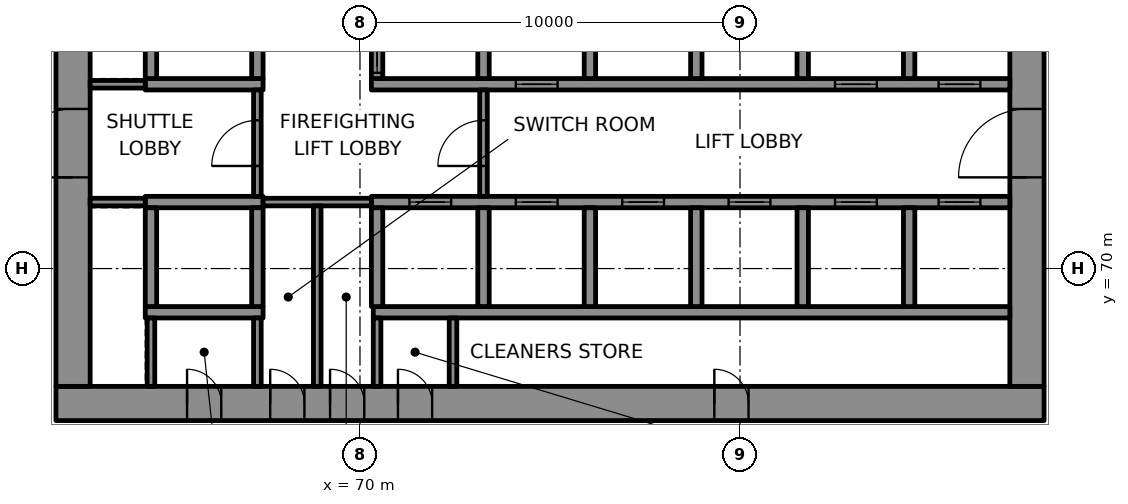
"""IFC4 building model, lengths in metres.
Left out: names, types, materials, properties, quantities, classifications, styles, units other than length and angle.
Written with IfcOpenShell. Run it as: python <this file> out.ifc"""

import sys

from ifc_helpers import new_model, si_unit, direction, frame, frame_2d, origin, place, context, subcontext, project, spatial, rectangle, extrude, element, fill, save


model = new_model("IFC4")
c1 = context("Model", 3, precision=1e-05, world=origin(), true_north=direction((0.0, 1.0)))
c2 = subcontext(c1, "Body", "Model", "MODEL_VIEW")
j1 = project(units=[si_unit("LENGTHUNIT", "METRE"), si_unit("PLANEANGLEUNIT", "RADIAN")], contexts=[c1])
p1 = place(None, origin())
s1 = spatial("IfcSite", under=j1, at=p1, CompositionType="ELEMENT")
p2 = place(p1, origin())
s2 = spatial("IfcBuilding", under=s1, at=p2, CompositionType="ELEMENT")
p3 = place(p2, frame((0.0, 0.0, 69.4)))
s3 = spatial("IfcBuildingStorey", under=s2, at=p3, CompositionType="ELEMENT", Elevation=69.4)
p4 = place(p3, frame((62.0, 66.45, 0.0), z_axis=(0.0, 0.0, 1.0), x_axis=(1.0, 0.0, 0.0)))
e1 = element("IfcWall", 1, at=p4, inside=s3, PredefinedType="SHEAR", context=c2, shape_type="SweptSolid", body=[
    extrude(rectangle(XDim=26.0, YDim=0.9, at=frame_2d((13.0, 0.0))), origin(), (0.0, 0.0, 1.0), 4.0),
])
p5 = place(p4, frame((3.45, 0.0, 0.0)))
e2 = element("IfcOpeningElement", 2, at=p5, cuts=e1, PredefinedType="OPENING", context=c2, shape_type="SweptSolid", body=[
    extrude(rectangle(XDim=0.9, YDim=2.1, at=frame_2d((0.45, 1.05))), frame((0.0, 0.46, 0.0), z_axis=(0.0, -1.0, 0.0), x_axis=(1.0, 0.0, 0.0)), (0.0, 0.0, 1.0), 0.92),
])
p6 = place(p4, frame((5.637, 0.0, 0.0)))
e3 = element("IfcOpeningElement", 3, at=p6, cuts=e1, PredefinedType="OPENING", context=c2, shape_type="SweptSolid", body=[
    extrude(rectangle(XDim=0.9, YDim=2.1, at=frame_2d((0.45, 1.05))), frame((0.0, 0.46, 0.0), z_axis=(0.0, -1.0, 0.0), x_axis=(1.0, 0.0, 0.0)), (0.0, 0.0, 1.0), 0.92),
])
p7 = place(p4, frame((7.212, 0.0, 0.0)))
e4 = element("IfcOpeningElement", 4, at=p7, cuts=e1, PredefinedType="OPENING", context=c2, shape_type="SweptSolid", body=[
    extrude(rectangle(XDim=0.9, YDim=2.1, at=frame_2d((0.45, 1.05))), frame((0.0, 0.46, 0.0), z_axis=(0.0, -1.0, 0.0), x_axis=(1.0, 0.0, 0.0)), (0.0, 0.0, 1.0), 0.92),
])
p8 = place(p4, frame((8.999, 0.0, 0.0)))
e5 = element("IfcOpeningElement", 5, at=p8, cuts=e1, PredefinedType="OPENING", context=c2, shape_type="SweptSolid", body=[
    extrude(rectangle(XDim=0.9, YDim=2.1, at=frame_2d((0.45, 1.05))), frame((0.0, 0.46, 0.0), z_axis=(0.0, -1.0, 0.0), x_axis=(1.0, 0.0, 0.0)), (0.0, 0.0, 1.0), 0.92),
])
p9 = place(p4, frame((17.324, 0.0, 0.0)))
e6 = element("IfcOpeningElement", 6, at=p9, cuts=e1, PredefinedType="OPENING", context=c2, shape_type="SweptSolid", body=[
    extrude(rectangle(XDim=0.9, YDim=2.1, at=frame_2d((0.45, 1.05))), frame((0.0, 0.46, 0.0), z_axis=(0.0, -1.0, 0.0), x_axis=(1.0, 0.0, 0.0)), (0.0, 0.0, 1.0), 0.92),
])
p10 = place(p3, frame((62.45, 66.9, 0.0), z_axis=(0.0, 0.0, 1.0), x_axis=(0.0, 1.0, 0.0)))
e7 = element("IfcWall", 7, at=p10, inside=s3, PredefinedType="SHEAR", context=c2, shape_type="SweptSolid", body=[
    extrude(rectangle(XDim=16.2, YDim=0.9, at=frame_2d((8.1, 0.0))), origin(), (0.0, 0.0, 1.0), 4.0),
])
p11 = place(p10, frame((5.5, 0.0, 0.0)))
e8 = element("IfcOpeningElement", 8, at=p11, cuts=e7, PredefinedType="OPENING", context=c2, shape_type="SweptSolid", body=[
    extrude(rectangle(XDim=1.8, YDim=2.1, at=frame_2d((0.9, 1.05))), frame((0.0, 0.46, 0.0), z_axis=(0.0, -1.0, 0.0), x_axis=(1.0, 0.0, 0.0)), (0.0, 0.0, 1.0), 0.92),
])
p12 = place(p3, frame((87.55, 66.9, 0.0), z_axis=(0.0, 0.0, 1.0), x_axis=(0.0, 1.0, 0.0)))
e9 = element("IfcWall", 9, at=p12, inside=s3, PredefinedType="SHEAR", context=c2, shape_type="SweptSolid", body=[
    extrude(rectangle(XDim=16.2, YDim=0.9, at=frame_2d((8.1, 0.0))), origin(), (0.0, 0.0, 1.0), 4.0),
])
p13 = place(p12, frame((5.5, 0.0, 0.0)))
e10 = element("IfcOpeningElement", 10, at=p13, cuts=e9, PredefinedType="OPENING", context=c2, shape_type="SweptSolid", body=[
    extrude(rectangle(XDim=1.8, YDim=2.1, at=frame_2d((0.9, 1.05))), frame((0.0, 0.46, 0.0), z_axis=(0.0, -1.0, 0.0), x_axis=(1.0, 0.0, 0.0)), (0.0, 0.0, 1.0), 0.92),
])
p14 = place(p12, frame((11.202, 0.0, 0.0)))
e11 = element("IfcOpeningElement", 11, at=p14, cuts=e9, PredefinedType="OPENING", context=c2, shape_type="SweptSolid", body=[
    extrude(rectangle(XDim=0.9, YDim=2.1, at=frame_2d((0.45, 1.05))), frame((0.0, 0.46, 0.0), z_axis=(0.0, -1.0, 0.0), x_axis=(1.0, 0.0, 0.0)), (0.0, 0.0, 1.0), 0.92),
])
p15 = place(p3, frame((64.35, 68.85, 0.0), z_axis=(0.0, 0.0, 1.0), x_axis=(1.0, 0.0, 0.0)))
e12 = element("IfcWall", 12, at=p15, inside=s3, PredefinedType="SHEAR", context=c2, shape_type="SweptSolid", body=[
    extrude(rectangle(XDim=3.1, YDim=0.3, at=frame_2d((1.55, 0.0))), origin(), (0.0, 0.0, 1.0), 4.0),
])
p16 = place(p3, frame((70.35, 68.85, 0.0), z_axis=(0.0, 0.0, 1.0), x_axis=(1.0, 0.0, 0.0)))
e13 = element("IfcWall", 13, at=p16, inside=s3, PredefinedType="SHEAR", context=c2, shape_type="SweptSolid", body=[
    extrude(rectangle(XDim=16.75, YDim=0.3, at=frame_2d((8.375, 0.0))), origin(), (0.0, 0.0, 1.0), 4.0),
])
p17 = place(p3, frame((64.35, 71.75, 0.0), z_axis=(0.0, 0.0, 1.0), x_axis=(1.0, 0.0, 0.0)))
e14 = element("IfcWall", 14, at=p17, inside=s3, PredefinedType="SHEAR", context=c2, shape_type="SweptSolid", body=[
    extrude(rectangle(XDim=3.1, YDim=0.3, at=frame_2d((1.55, 0.0))), origin(), (0.0, 0.0, 1.0), 4.0),
])
p18 = place(p3, frame((70.3, 71.75, 0.0), z_axis=(0.0, 0.0, 1.0), x_axis=(1.0, 0.0, 0.0)))
e15 = element("IfcWall", 15, at=p18, inside=s3, PredefinedType="SHEAR", context=c2, shape_type="SweptSolid", body=[
    extrude(rectangle(XDim=16.8, YDim=0.3, at=frame_2d((8.4, 0.0))), origin(), (0.0, 0.0, 1.0), 4.0),
])
p19 = place(p18, frame((1.0, 0.0, 0.0)))
e16 = element("IfcOpeningElement", 16, at=p19, cuts=e15, PredefinedType="OPENING", context=c2, shape_type="SweptSolid", body=[
    extrude(rectangle(XDim=1.1, YDim=2.1, at=frame_2d((0.55, 1.05))), frame((0.0, 0.16, 0.0), z_axis=(0.0, -1.0, 0.0), x_axis=(1.0, 0.0, 0.0)), (0.0, 0.0, 1.0), 0.32),
])
p20 = place(p18, frame((3.8, 0.0, 0.0)))
e17 = element("IfcOpeningElement", 17, at=p20, cuts=e15, PredefinedType="OPENING", context=c2, shape_type="SweptSolid", body=[
    extrude(rectangle(XDim=1.1, YDim=2.1, at=frame_2d((0.55, 1.05))), frame((0.0, 0.16, 0.0), z_axis=(0.0, -1.0, 0.0), x_axis=(1.0, 0.0, 0.0)), (0.0, 0.0, 1.0), 0.32),
])
p21 = place(p18, frame((6.6, 0.0, 0.0)))
e18 = element("IfcOpeningElement", 18, at=p21, cuts=e15, PredefinedType="OPENING", context=c2, shape_type="SweptSolid", body=[
    extrude(rectangle(XDim=1.1, YDim=2.1, at=frame_2d((0.55, 1.05))), frame((0.0, 0.16, 0.0), z_axis=(0.0, -1.0, 0.0), x_axis=(1.0, 0.0, 0.0)), (0.0, 0.0, 1.0), 0.32),
])
p22 = place(p18, frame((9.4, 0.0, 0.0)))
e19 = element("IfcOpeningElement", 19, at=p22, cuts=e15, PredefinedType="OPENING", context=c2, shape_type="SweptSolid", body=[
    extrude(rectangle(XDim=1.1, YDim=2.1, at=frame_2d((0.55, 1.05))), frame((0.0, 0.16, 0.0), z_axis=(0.0, -1.0, 0.0), x_axis=(1.0, 0.0, 0.0)), (0.0, 0.0, 1.0), 0.32),
])
p23 = place(p18, frame((12.2, 0.0, 0.0)))
e20 = element("IfcOpeningElement", 20, at=p23, cuts=e15, PredefinedType="OPENING", context=c2, shape_type="SweptSolid", body=[
    extrude(rectangle(XDim=1.1, YDim=2.1, at=frame_2d((0.55, 1.05))), frame((0.0, 0.16, 0.0), z_axis=(0.0, -1.0, 0.0), x_axis=(1.0, 0.0, 0.0)), (0.0, 0.0, 1.0), 0.32),
])
p24 = place(p18, frame((14.925, 0.0, 0.0)))
e21 = element("IfcOpeningElement", 21, at=p24, cuts=e15, PredefinedType="OPENING", context=c2, shape_type="SweptSolid", body=[
    extrude(rectangle(XDim=1.1, YDim=2.1, at=frame_2d((0.55, 1.05))), frame((0.0, 0.16, 0.0), z_axis=(0.0, -1.0, 0.0), x_axis=(1.0, 0.0, 0.0)), (0.0, 0.0, 1.0), 0.32),
])
p25 = place(p3, frame((64.35, 74.85, 0.0), z_axis=(0.0, 0.0, 1.0), x_axis=(1.0, 0.0, 0.0)))
e22 = element("IfcWall", 22, at=p25, inside=s3, PredefinedType="SHEAR", context=c2, shape_type="SweptSolid", body=[
    extrude(rectangle(XDim=3.1, YDim=0.3, at=frame_2d((1.55, 0.0))), origin(), (0.0, 0.0, 1.0), 4.0),
])
p26 = place(p3, frame((70.3, 74.85, 0.0), z_axis=(0.0, 0.0, 1.0), x_axis=(1.0, 0.0, 0.0)))
e23 = element("IfcWall", 23, at=p26, inside=s3, PredefinedType="SHEAR", context=c2, shape_type="SweptSolid", body=[
    extrude(rectangle(XDim=16.8, YDim=0.3, at=frame_2d((8.4, 0.0))), origin(), (0.0, 0.0, 1.0), 4.0),
])
p27 = place(p26, frame((3.8, 0.0, 0.0)))
e24 = element("IfcOpeningElement", 24, at=p27, cuts=e23, PredefinedType="OPENING", context=c2, shape_type="SweptSolid", body=[
    extrude(rectangle(XDim=1.1, YDim=2.1, at=frame_2d((0.55, 1.05))), frame((0.0, 0.16, 0.0), z_axis=(0.0, -1.0, 0.0), x_axis=(1.0, 0.0, 0.0)), (0.0, 0.0, 1.0), 0.32),
])
p28 = place(p26, frame((12.2, 0.0, 0.0)))
e25 = element("IfcOpeningElement", 25, at=p28, cuts=e23, PredefinedType="OPENING", context=c2, shape_type="SweptSolid", body=[
    extrude(rectangle(XDim=1.1, YDim=2.1, at=frame_2d((0.55, 1.05))), frame((0.0, 0.16, 0.0), z_axis=(0.0, -1.0, 0.0), x_axis=(1.0, 0.0, 0.0)), (0.0, 0.0, 1.0), 0.32),
])
p29 = place(p26, frame((14.925, 0.0, 0.0)))
e26 = element("IfcOpeningElement", 26, at=p29, cuts=e23, PredefinedType="OPENING", context=c2, shape_type="SweptSolid", body=[
    extrude(rectangle(XDim=1.1, YDim=2.1, at=frame_2d((0.55, 1.05))), frame((0.0, 0.16, 0.0), z_axis=(0.0, -1.0, 0.0), x_axis=(1.0, 0.0, 0.0)), (0.0, 0.0, 1.0), 0.32),
])
for number, where, z_axis, x_axis in (
    (27, (64.5, 69.0, 0.0), (0.0, 0.0, 1.0), (0.0, 1.0, 0.0)),
    (28, (64.5, 75.0, 0.0), (0.0, 0.0, 1.0), (0.0, 1.0, 0.0)),
    (29, (67.3, 69.0, 0.0), (0.0, 0.0, 1.0), (0.0, 1.0, 0.0)),
    (30, (67.3, 75.0, 0.0), (0.0, 0.0, 1.0), (0.0, 1.0, 0.0)),
    (31, (70.45, 69.0, 0.0), (0.0, 0.0, 1.0), (0.0, 1.0, 0.0)),
):
    element("IfcWall", number, at=place(p3, frame(where, z_axis=z_axis, x_axis=x_axis)), inside=s3, PredefinedType="SHEAR", context=c2, shape_type="SweptSolid", body=[
        extrude(rectangle(XDim=2.6, YDim=0.3, at=frame_2d((1.3, 0.0))), origin(), (0.0, 0.0, 1.0), 4.0),
    ])
p30 = place(p3, frame((70.45, 75.0, 0.0), z_axis=(0.0, 0.0, 1.0), x_axis=(0.0, 1.0, 0.0)))
e32 = element("IfcWall", 32, at=p30, inside=s3, PredefinedType="SHEAR", context=c2, shape_type="SweptSolid", body=[
    extrude(rectangle(XDim=2.6, YDim=0.3, at=frame_2d((1.3, 0.0))), origin(), (0.0, 0.0, 1.0), 4.0),
])
p31 = place(p30, frame((0.15, 0.0, 0.0)))
e33 = element("IfcOpeningElement", 33, at=p31, cuts=e32, PredefinedType="OPENING", context=c2, shape_type="SweptSolid", body=[
    extrude(rectangle(XDim=1.1, YDim=2.1, at=frame_2d((0.55, 1.05))), frame((0.0, 0.16, 0.0), z_axis=(0.0, -1.0, 0.0), x_axis=(1.0, 0.0, 0.0)), (0.0, 0.0, 1.0), 0.32),
])
for number, where, z_axis, x_axis in (
    (34, (73.25, 69.0, 0.0), (0.0, 0.0, 1.0), (0.0, 1.0, 0.0)),
    (35, (73.25, 75.0, 0.0), (0.0, 0.0, 1.0), (0.0, 1.0, 0.0)),
    (36, (76.05, 69.0, 0.0), (0.0, 0.0, 1.0), (0.0, 1.0, 0.0)),
    (37, (76.05, 75.0, 0.0), (0.0, 0.0, 1.0), (0.0, 1.0, 0.0)),
    (38, (78.85, 69.0, 0.0), (0.0, 0.0, 1.0), (0.0, 1.0, 0.0)),
    (39, (78.85, 75.0, 0.0), (0.0, 0.0, 1.0), (0.0, 1.0, 0.0)),
    (40, (81.65, 69.0, 0.0), (0.0, 0.0, 1.0), (0.0, 1.0, 0.0)),
    (41, (81.65, 75.0, 0.0), (0.0, 0.0, 1.0), (0.0, 1.0, 0.0)),
    (42, (84.45, 69.0, 0.0), (0.0, 0.0, 1.0), (0.0, 1.0, 0.0)),
    (43, (84.45, 75.0, 0.0), (0.0, 0.0, 1.0), (0.0, 1.0, 0.0)),
):
    element("IfcWall", number, at=place(p3, frame(where, z_axis=z_axis, x_axis=x_axis)), inside=s3, PredefinedType="SHEAR", context=c2, shape_type="SweptSolid", body=[
        extrude(rectangle(XDim=2.6, YDim=0.3, at=frame_2d((1.3, 0.0))), origin(), (0.0, 0.0, 1.0), 4.0),
    ])
p32 = place(p3, frame((62.9, 71.75, 0.0), z_axis=(0.0, 0.0, 1.0), x_axis=(1.0, 0.0, 0.0)))
e44 = element("IfcWall", 44, at=p32, inside=s3, PredefinedType="PARTITIONING", context=c2, shape_type="SweptSolid", body=[
    extrude(rectangle(XDim=1.45, YDim=0.2, at=frame_2d((0.725, 0.0))), origin(), (0.0, 0.0, 1.0), 4.0),
])
p33 = place(p3, frame((67.45, 71.75, 0.0), z_axis=(0.0, 0.0, 1.0), x_axis=(1.0, 0.0, 0.0)))
e45 = element("IfcWall", 45, at=p33, inside=s3, PredefinedType="PARTITIONING", context=c2, shape_type="SweptSolid", body=[
    extrude(rectangle(XDim=2.85, YDim=0.2, at=frame_2d((1.425, 0.0))), origin(), (0.0, 0.0, 1.0), 4.0),
])
p34 = place(p3, frame((62.9, 74.85, 0.0), z_axis=(0.0, 0.0, 1.0), x_axis=(1.0, 0.0, 0.0)))
e46 = element("IfcWall", 46, at=p34, inside=s3, PredefinedType="PARTITIONING", context=c2, shape_type="SweptSolid", body=[
    extrude(rectangle(XDim=1.45, YDim=0.2, at=frame_2d((0.725, 0.0))), origin(), (0.0, 0.0, 1.0), 4.0),
])
for number, where, z_axis, x_axis in (
    (47, (64.5, 66.9, 0.0), (0.0, 0.0, 1.0), (0.0, 1.0, 0.0)),
    (48, (67.3, 66.9, 0.0), (0.0, 0.0, 1.0), (0.0, 1.0, 0.0)),
):
    element("IfcWall", number, at=place(p3, frame(where, z_axis=z_axis, x_axis=x_axis)), inside=s3, PredefinedType="PARTITIONING", context=c2, shape_type="SweptSolid", body=[
        extrude(rectangle(XDim=1.8, YDim=0.2, at=frame_2d((0.9, 0.0))), origin(), (0.0, 0.0, 1.0), 4.0),
    ])
p35 = place(p3, frame((67.3, 71.9, 0.0), z_axis=(0.0, 0.0, 1.0), x_axis=(0.0, 1.0, 0.0)))
e49 = element("IfcWall", 49, at=p35, inside=s3, PredefinedType="PARTITIONING", context=c2, shape_type="SweptSolid", body=[
    extrude(rectangle(XDim=2.8, YDim=0.2, at=frame_2d((1.4, 0.0))), origin(), (0.0, 0.0, 1.0), 4.0),
])
p36 = place(p35, frame((0.8, 0.0, 0.0)))
e50 = element("IfcOpeningElement", 50, at=p36, cuts=e49, PredefinedType="OPENING", context=c2, shape_type="SweptSolid", body=[
    extrude(rectangle(XDim=1.2, YDim=2.1, at=frame_2d((0.6, 1.05))), frame((0.0, 0.11, 0.0), z_axis=(0.0, -1.0, 0.0), x_axis=(1.0, 0.0, 0.0)), (0.0, 0.0, 1.0), 0.22),
])
p37 = place(p3, frame((68.875, 66.9, 0.0), z_axis=(0.0, 0.0, 1.0), x_axis=(0.0, 1.0, 0.0)))
e51 = element("IfcWall", 51, at=p37, inside=s3, PredefinedType="PARTITIONING", context=c2, shape_type="SweptSolid", body=[
    extrude(rectangle(XDim=4.75, YDim=0.2, at=frame_2d((2.375, 0.0))), origin(), (0.0, 0.0, 1.0), 4.0),
])
for number, where, z_axis, x_axis in (
    (52, (70.45, 66.9, 0.0), (0.0, 0.0, 1.0), (0.0, 1.0, 0.0)),
    (53, (72.448, 66.9, 0.0), (0.0, 0.0, 1.0), (0.0, 1.0, 0.0)),
):
    element("IfcWall", number, at=place(p3, frame(where, z_axis=z_axis, x_axis=x_axis)), inside=s3, PredefinedType="PARTITIONING", context=c2, shape_type="SweptSolid", body=[
        extrude(rectangle(XDim=1.8, YDim=0.2, at=frame_2d((0.9, 0.0))), origin(), (0.0, 0.0, 1.0), 4.0),
    ])
p38 = place(p3, frame((73.25, 71.9, 0.0), z_axis=(0.0, 0.0, 1.0), x_axis=(0.0, 1.0, 0.0)))
e54 = element("IfcWall", 54, at=p38, inside=s3, PredefinedType="PARTITIONING", context=c2, shape_type="SweptSolid", body=[
    extrude(rectangle(XDim=2.8, YDim=0.2, at=frame_2d((1.4, 0.0))), origin(), (0.0, 0.0, 1.0), 4.0),
])
p39 = place(p38, frame((0.8, 0.0, 0.0)))
e55 = element("IfcOpeningElement", 55, at=p39, cuts=e54, PredefinedType="OPENING", context=c2, shape_type="SweptSolid", body=[
    extrude(rectangle(XDim=1.2, YDim=2.1, at=frame_2d((0.6, 1.05))), frame((0.0, 0.11, 0.0), z_axis=(0.0, -1.0, 0.0), x_axis=(1.0, 0.0, 0.0)), (0.0, 0.0, 1.0), 0.22),
])
p40 = place(p19, origin())
e56 = element("IfcDoor", 56, at=p40, inside=s3, OperationType="DOUBLE_DOOR_SLIDING", PredefinedType="DOOR", context=c2, shape_type="SweptSolid", body=[
    extrude(rectangle(XDim=1.1, YDim=2.1, at=frame_2d((0.55, 1.05))), frame((0.0, 0.025, 0.0), z_axis=(0.0, -1.0, 0.0), x_axis=(1.0, 0.0, 0.0)), (0.0, 0.0, 1.0), 0.05),
])
fill(e16, e56)
p41 = place(p20, origin())
e57 = element("IfcDoor", 57, at=p41, inside=s3, OperationType="DOUBLE_DOOR_SLIDING", PredefinedType="DOOR", context=c2, shape_type="SweptSolid", body=[
    extrude(rectangle(XDim=1.1, YDim=2.1, at=frame_2d((0.55, 1.05))), frame((0.0, 0.025, 0.0), z_axis=(0.0, -1.0, 0.0), x_axis=(1.0, 0.0, 0.0)), (0.0, 0.0, 1.0), 0.05),
])
fill(e17, e57)
p42 = place(p21, origin())
e58 = element("IfcDoor", 58, at=p42, inside=s3, OperationType="DOUBLE_DOOR_SLIDING", PredefinedType="DOOR", context=c2, shape_type="SweptSolid", body=[
    extrude(rectangle(XDim=1.1, YDim=2.1, at=frame_2d((0.55, 1.05))), frame((0.0, 0.025, 0.0), z_axis=(0.0, -1.0, 0.0), x_axis=(1.0, 0.0, 0.0)), (0.0, 0.0, 1.0), 0.05),
])
fill(e18, e58)
p43 = place(p22, origin())
e59 = element("IfcDoor", 59, at=p43, inside=s3, OperationType="DOUBLE_DOOR_SLIDING", PredefinedType="DOOR", context=c2, shape_type="SweptSolid", body=[
    extrude(rectangle(XDim=1.1, YDim=2.1, at=frame_2d((0.55, 1.05))), frame((0.0, 0.025, 0.0), z_axis=(0.0, -1.0, 0.0), x_axis=(1.0, 0.0, 0.0)), (0.0, 0.0, 1.0), 0.05),
])
fill(e19, e59)
p44 = place(p23, origin())
e60 = element("IfcDoor", 60, at=p44, inside=s3, OperationType="DOUBLE_DOOR_SLIDING", PredefinedType="DOOR", context=c2, shape_type="SweptSolid", body=[
    extrude(rectangle(XDim=1.1, YDim=2.1, at=frame_2d((0.55, 1.05))), frame((0.0, 0.025, 0.0), z_axis=(0.0, -1.0, 0.0), x_axis=(1.0, 0.0, 0.0)), (0.0, 0.0, 1.0), 0.05),
])
fill(e20, e60)
p45 = place(p24, origin())
e61 = element("IfcDoor", 61, at=p45, inside=s3, OperationType="DOUBLE_DOOR_SLIDING", PredefinedType="DOOR", context=c2, shape_type="SweptSolid", body=[
    extrude(rectangle(XDim=1.1, YDim=2.1, at=frame_2d((0.55, 1.05))), frame((0.0, 0.025, 0.0), z_axis=(0.0, -1.0, 0.0), x_axis=(1.0, 0.0, 0.0)), (0.0, 0.0, 1.0), 0.05),
])
fill(e21, e61)
p46 = place(p31, origin())
e62 = element("IfcDoor", 62, at=p46, inside=s3, OperationType="DOUBLE_DOOR_SLIDING", PredefinedType="DOOR", context=c2, shape_type="SweptSolid", body=[
    extrude(rectangle(XDim=1.1, YDim=2.1, at=frame_2d((0.55, 1.05))), frame((0.0, 0.025, 0.0), z_axis=(0.0, -1.0, 0.0), x_axis=(1.0, 0.0, 0.0)), (0.0, 0.0, 1.0), 0.05),
])
fill(e33, e62)
p47 = place(p27, origin())
e63 = element("IfcDoor", 63, at=p47, inside=s3, OperationType="DOUBLE_DOOR_SLIDING", PredefinedType="DOOR", context=c2, shape_type="SweptSolid", body=[
    extrude(rectangle(XDim=1.1, YDim=2.1, at=frame_2d((0.55, 1.05))), frame((0.0, 0.025, 0.0), z_axis=(0.0, -1.0, 0.0), x_axis=(1.0, 0.0, 0.0)), (0.0, 0.0, 1.0), 0.05),
])
fill(e24, e63)
p48 = place(p28, origin())
e64 = element("IfcDoor", 64, at=p48, inside=s3, OperationType="DOUBLE_DOOR_SLIDING", PredefinedType="DOOR", context=c2, shape_type="SweptSolid", body=[
    extrude(rectangle(XDim=1.1, YDim=2.1, at=frame_2d((0.55, 1.05))), frame((0.0, 0.025, 0.0), z_axis=(0.0, -1.0, 0.0), x_axis=(1.0, 0.0, 0.0)), (0.0, 0.0, 1.0), 0.05),
])
fill(e25, e64)
p49 = place(p29, origin())
e65 = element("IfcDoor", 65, at=p49, inside=s3, OperationType="DOUBLE_DOOR_SLIDING", PredefinedType="DOOR", context=c2, shape_type="SweptSolid", body=[
    extrude(rectangle(XDim=1.1, YDim=2.1, at=frame_2d((0.55, 1.05))), frame((0.0, 0.025, 0.0), z_axis=(0.0, -1.0, 0.0), x_axis=(1.0, 0.0, 0.0)), (0.0, 0.0, 1.0), 0.05),
])
fill(e26, e65)
p50 = place(p39, origin())
e66 = element("IfcDoor", 66, at=p50, inside=s3, OperationType="SINGLE_SWING_LEFT", PredefinedType="DOOR", context=c2, shape_type="SweptSolid", body=[
    extrude(rectangle(XDim=1.2, YDim=2.1, at=frame_2d((0.6, 1.05))), frame((0.0, 0.025, 0.0), z_axis=(0.0, -1.0, 0.0), x_axis=(1.0, 0.0, 0.0)), (0.0, 0.0, 1.0), 0.05),
])
fill(e55, e66)
p51 = place(p36, origin())
e67 = element("IfcDoor", 67, at=p51, inside=s3, OperationType="SINGLE_SWING_RIGHT", PredefinedType="DOOR", context=c2, shape_type="SweptSolid", body=[
    extrude(rectangle(XDim=1.2, YDim=2.1, at=frame_2d((0.6, 1.05))), frame((0.0, 0.025, 0.0), z_axis=(0.0, -1.0, 0.0), x_axis=(1.0, 0.0, 0.0)), (0.0, 0.0, 1.0), 0.05),
])
fill(e50, e67)
p52 = place(p11, origin())
e68 = element("IfcDoor", 68, at=p52, inside=s3, OperationType="SINGLE_SWING_LEFT", PredefinedType="DOOR", context=c2, shape_type="SweptSolid", body=[
    extrude(rectangle(XDim=1.8, YDim=2.1, at=frame_2d((0.9, 1.05))), frame((0.0, 0.17, 0.0), z_axis=(0.0, -1.0, 0.0), x_axis=(1.0, 0.0, 0.0)), (0.0, 0.0, 1.0), 0.34),
])
fill(e8, e68)
p53 = place(p13, origin())
e69 = element("IfcDoor", 69, at=p53, inside=s3, OperationType="SINGLE_SWING_RIGHT", PredefinedType="DOOR", context=c2, shape_type="SweptSolid", body=[
    extrude(rectangle(XDim=1.8, YDim=2.1, at=frame_2d((0.9, 1.05))), frame((0.0, 0.17, 0.0), z_axis=(0.0, -1.0, 0.0), x_axis=(1.0, 0.0, 0.0)), (0.0, 0.0, 1.0), 0.34),
])
fill(e10, e69)
p54 = place(p5, origin())
e70 = element("IfcDoor", 70, at=p54, inside=s3, OperationType="SINGLE_SWING_LEFT", PredefinedType="DOOR", context=c2, shape_type="SweptSolid", body=[
    extrude(rectangle(XDim=0.9, YDim=2.1, at=frame_2d((0.45, 1.05))), frame((0.0, 0.17, 0.0), z_axis=(0.0, -1.0, 0.0), x_axis=(1.0, 0.0, 0.0)), (0.0, 0.0, 1.0), 0.34),
])
fill(e2, e70)
p55 = place(p6, origin())
e71 = element("IfcDoor", 71, at=p55, inside=s3, OperationType="SINGLE_SWING_RIGHT", PredefinedType="DOOR", context=c2, shape_type="SweptSolid", body=[
    extrude(rectangle(XDim=0.9, YDim=2.1, at=frame_2d((0.45, 1.05))), frame((0.0, 0.17, 0.0), z_axis=(0.0, -1.0, 0.0), x_axis=(1.0, 0.0, 0.0)), (0.0, 0.0, 1.0), 0.34),
])
fill(e3, e71)
p56 = place(p7, origin())
e72 = element("IfcDoor", 72, at=p56, inside=s3, OperationType="SINGLE_SWING_LEFT", PredefinedType="DOOR", context=c2, shape_type="SweptSolid", body=[
    extrude(rectangle(XDim=0.9, YDim=2.1, at=frame_2d((0.45, 1.05))), frame((0.0, 0.17, 0.0), z_axis=(0.0, -1.0, 0.0), x_axis=(1.0, 0.0, 0.0)), (0.0, 0.0, 1.0), 0.34),
])
fill(e4, e72)
p57 = place(p8, origin())
e73 = element("IfcDoor", 73, at=p57, inside=s3, OperationType="SINGLE_SWING_RIGHT", PredefinedType="DOOR", context=c2, shape_type="SweptSolid", body=[
    extrude(rectangle(XDim=0.9, YDim=2.1, at=frame_2d((0.45, 1.05))), frame((0.0, 0.17, 0.0), z_axis=(0.0, -1.0, 0.0), x_axis=(1.0, 0.0, 0.0)), (0.0, 0.0, 1.0), 0.34),
])
fill(e5, e73)
p58 = place(p9, origin())
e74 = element("IfcDoor", 74, at=p58, inside=s3, OperationType="SINGLE_SWING_LEFT", PredefinedType="DOOR", context=c2, shape_type="SweptSolid", body=[
    extrude(rectangle(XDim=0.9, YDim=2.1, at=frame_2d((0.45, 1.05))), frame((0.0, 0.17, 0.0), z_axis=(0.0, -1.0, 0.0), x_axis=(1.0, 0.0, 0.0)), (0.0, 0.0, 1.0), 0.34),
])
fill(e6, e74)
save(model, sys.argv[1])
